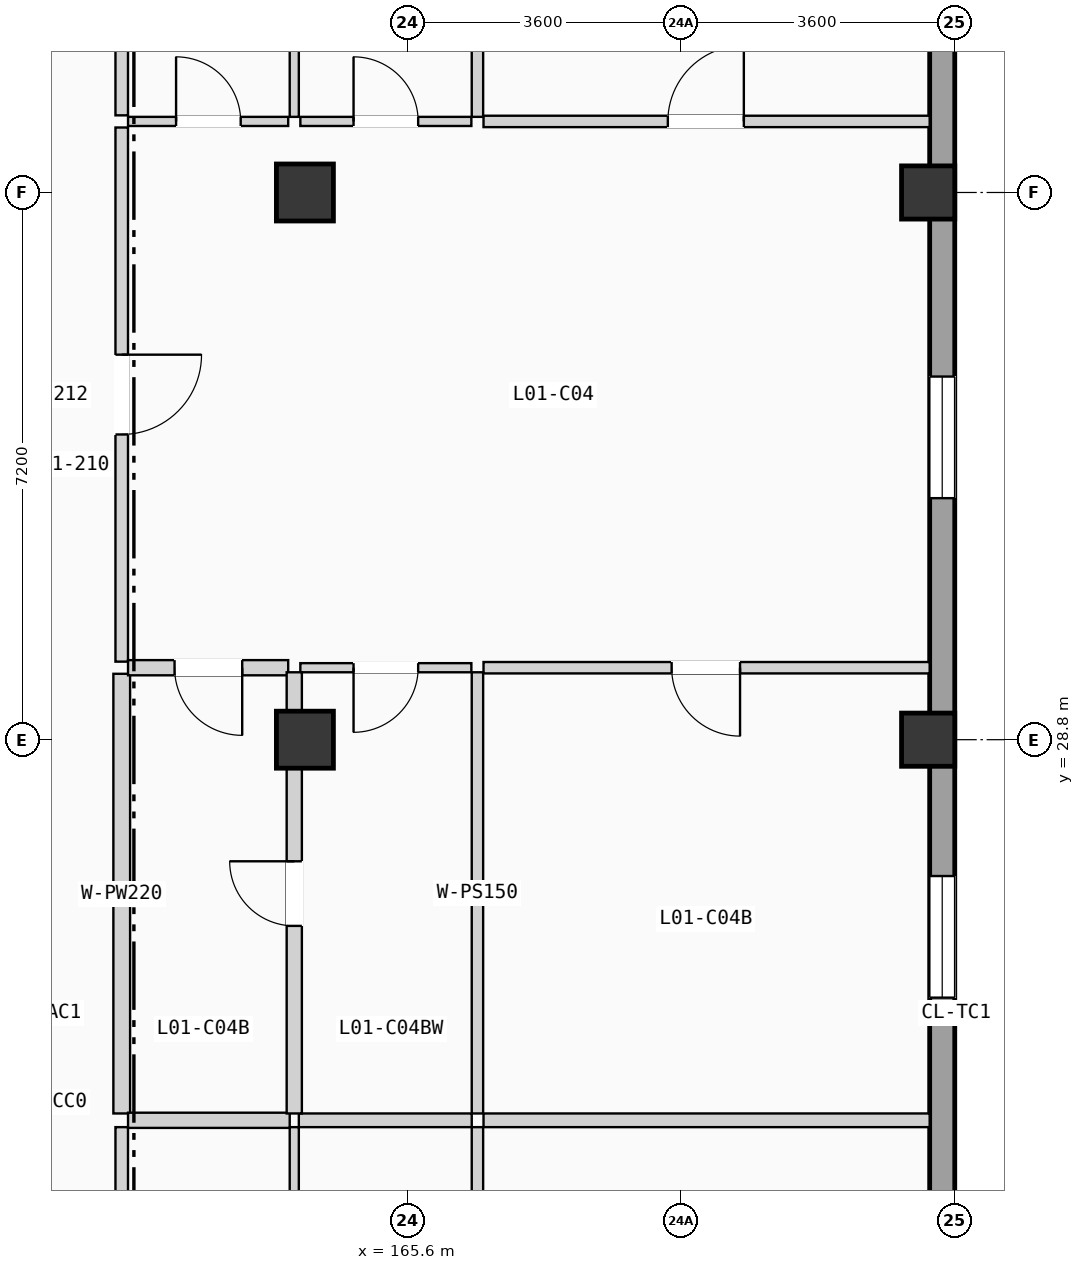
"""IFC4 building model, lengths in metres.
Left out: names, types, materials, properties, quantities, classifications, styles, units other than length and angle.
Written with IfcOpenShell. Run it as: python <this file> out.ifc"""

import sys

from ifc_helpers import new_model, si_unit, direction, frame, frame_2d, origin, origin_2d, place, context, subcontext, project, spatial, rectangle, extrude, element, fill, save


model = new_model("IFC4")
c1 = context("Model", 3, precision=1e-05, world=origin(), true_north=direction((0.0, 1.0)))
c2 = subcontext(c1, "Body", "Model", "MODEL_VIEW")
j1 = project(units=[si_unit("LENGTHUNIT", "METRE"), si_unit("PLANEANGLEUNIT", "RADIAN")], contexts=[c1])
p1 = place(None, origin())
s1 = spatial("IfcSite", under=j1, at=p1, CompositionType="ELEMENT")
p2 = place(p1, origin())
s2 = spatial("IfcBuilding", under=s1, at=p2, CompositionType="ELEMENT")
p3 = place(p2, frame((0.0, 0.0, 4.9)))
s3 = spatial("IfcBuildingStorey", under=s2, at=p3, CompositionType="ELEMENT", Elevation=4.9)
for number, where, z_axis, x_axis in (
    (1, (164.25, 28.8, 0.0), (0.0, 0.0, 1.0), (1.0, 0.0, 0.0)),
    (2, (164.25, 36.0, 0.0), (0.0, 0.0, 1.0), (1.0, 0.0, 0.0)),
):
    element("IfcColumn", number, at=place(p3, frame(where, z_axis=z_axis, x_axis=x_axis)), inside=s3, PredefinedType="COLUMN", context=c2, shape_type="SweptSolid", body=[
        extrude(rectangle(XDim=0.75, YDim=0.75, at=origin_2d()), origin(), (0.0, 0.0, 1.0), 3.675),
    ])
for number, where, z_axis, x_axis in (
    (3, (172.45, 28.8, 0.0), (0.0, 0.0, 1.0), (1.0, 0.0, 0.0)),
    (4, (172.45, 36.0, 0.0), (0.0, 0.0, 1.0), (1.0, 0.0, 0.0)),
):
    element("IfcColumn", number, at=place(p3, frame(where, z_axis=z_axis, x_axis=x_axis)), inside=s3, PredefinedType="COLUMN", context=c2, shape_type="SweptSolid", body=[
        extrude(rectangle(XDim=0.7, YDim=0.7, at=origin_2d()), origin(), (0.0, 0.0, 1.0), 3.675),
    ])
p4 = place(p3, frame((172.635, 0.33, 0.0), z_axis=(0.0, 0.0, 1.0), x_axis=(0.0, 1.0, 0.0)))
e5 = element("IfcWall", 5, at=p4, inside=s3, PredefinedType="SOLIDWALL", context=c2, shape_type="SweptSolid", body=[
    extrude(rectangle(XDim=49.74, YDim=0.33, at=frame_2d((24.87, 0.0))), origin(), (0.0, 0.0, 1.0), 3.415),
])
p5 = place(p4, frame((15.58, 0.0, 0.9)))
e6 = element("IfcOpeningElement", 6, at=p5, cuts=e5, PredefinedType="OPENING", context=c2, shape_type="SweptSolid", body=[
    extrude(rectangle(XDim=1.48, YDim=1.65, at=frame_2d((0.74, 0.825))), frame((0.0, 0.175, 0.0), z_axis=(0.0, -1.0, 0.0), x_axis=(1.0, 0.0, 0.0)), (0.0, 0.0, 1.0), 0.35),
])
p6 = place(p4, frame((8.986, 0.0, 0.9)))
e7 = element("IfcOpeningElement", 7, at=p6, cuts=e5, PredefinedType="OPENING", context=c2, shape_type="SweptSolid", body=[
    extrude(rectangle(XDim=1.48, YDim=1.8, at=frame_2d((0.74, 0.9))), frame((0.0, 0.175, 0.0), z_axis=(0.0, -1.0, 0.0), x_axis=(1.0, 0.0, 0.0)), (0.0, 0.0, 1.0), 0.35),
])
p7 = place(p4, frame((18.93, 0.0, 0.9)))
e8 = element("IfcOpeningElement", 8, at=p7, cuts=e5, PredefinedType="OPENING", context=c2, shape_type="SweptSolid", body=[
    extrude(rectangle(XDim=1.6, YDim=1.2, at=frame_2d((0.8, 0.6))), frame((0.0, 0.175, 0.0), z_axis=(0.0, -1.0, 0.0), x_axis=(1.0, 0.0, 0.0)), (0.0, 0.0, 1.0), 0.35),
])
p8 = place(p4, frame((31.648, 0.0, 0.9)))
e9 = element("IfcOpeningElement", 9, at=p8, cuts=e5, PredefinedType="OPENING", context=c2, shape_type="SweptSolid", body=[
    extrude(rectangle(XDim=1.6, YDim=1.35, at=frame_2d((0.8, 0.675))), frame((0.0, 0.175, 0.0), z_axis=(0.0, -1.0, 0.0), x_axis=(1.0, 0.0, 0.0)), (0.0, 0.0, 1.0), 0.35),
])
p9 = place(p4, frame((25.076, 0.0, 0.9)))
e10 = element("IfcOpeningElement", 10, at=p9, cuts=e5, PredefinedType="OPENING", context=c2, shape_type="SweptSolid", body=[
    extrude(rectangle(XDim=1.6, YDim=1.5, at=frame_2d((0.8, 0.75))), frame((0.0, 0.175, 0.0), z_axis=(0.0, -1.0, 0.0), x_axis=(1.0, 0.0, 0.0)), (0.0, 0.0, 1.0), 0.35),
])
p10 = place(p4, frame((38.778, 0.0, 0.9)))
e11 = element("IfcOpeningElement", 11, at=p10, cuts=e5, PredefinedType="OPENING", context=c2, shape_type="SweptSolid", body=[
    extrude(rectangle(XDim=1.6, YDim=1.65, at=frame_2d((0.8, 0.825))), frame((0.0, 0.175, 0.0), z_axis=(0.0, -1.0, 0.0), x_axis=(1.0, 0.0, 0.0)), (0.0, 0.0, 1.0), 0.35),
])
p11 = place(p3, frame((161.84, 18.79, 0.0), z_axis=(0.0, 0.0, 1.0), x_axis=(0.0, 1.0, 0.0)))
e12 = element("IfcWall", 12, at=p11, inside=s3, PredefinedType="PARTITIONING", context=c2, shape_type="SweptSolid", body=[
    extrude(rectangle(XDim=4.912, YDim=0.165, at=frame_2d((2.456, 0.0))), origin(), (0.0, 0.0, 1.0), 3.395),
])
p12 = place(p3, frame((161.84, 29.827, 0.0), z_axis=(0.0, 0.0, 1.0), x_axis=(0.0, 1.0, 0.0)))
e13 = element("IfcWall", 13, at=p12, inside=s3, PredefinedType="PARTITIONING", context=c2, shape_type="SweptSolid", body=[
    extrude(rectangle(XDim=7.028, YDim=0.165, at=frame_2d((3.514, 0.0))), origin(), (0.0, 0.0, 1.0), 3.395),
])
p13 = place(p12, frame((2.989, 0.0, 0.0)))
e14 = element("IfcOpeningElement", 14, at=p13, cuts=e13, PredefinedType="OPENING", context=c2, shape_type="SweptSolid", body=[
    extrude(rectangle(XDim=1.05, YDim=2.13, at=frame_2d((0.525, 1.065))), frame((0.0, 0.093, 0.0), z_axis=(0.0, -1.0, 0.0), x_axis=(1.0, 0.0, 0.0)), (0.0, 0.0, 1.0), 0.185),
])
p14 = place(p3, frame((161.84, 23.882, 0.0), z_axis=(0.0, 0.0, 1.0), x_axis=(0.0, 1.0, 0.0)))
e15 = element("IfcWall", 15, at=p14, inside=s3, PredefinedType="PLUMBINGWALL", context=c2, shape_type="SweptSolid", body=[
    extrude(rectangle(XDim=5.785, YDim=0.22, at=frame_2d((2.893, 0.0))), origin(), (0.0, 0.0, 1.0), 3.395),
])
p15 = place(p3, frame((161.84, 37.015, 0.0), z_axis=(0.0, 0.0, 1.0), x_axis=(0.0, 1.0, 0.0)))
e16 = element("IfcWall", 16, at=p15, inside=s3, PredefinedType="PARTITIONING", context=c2, shape_type="SweptSolid", body=[
    extrude(rectangle(XDim=5.785, YDim=0.165, at=frame_2d((2.893, 0.0))), origin(), (0.0, 0.0, 1.0), 3.395),
])
p16 = place(p3, frame((164.11, 18.77, 0.0), z_axis=(0.0, 0.0, 1.0), x_axis=(0.0, 1.0, 0.0)))
e17 = element("IfcWall", 17, at=p16, inside=s3, PredefinedType="PARTITIONING", context=c2, shape_type="SweptSolid", body=[
    extrude(rectangle(XDim=4.932, YDim=0.12, at=frame_2d((2.466, 0.0))), origin(), (0.0, 0.0, 1.0), 3.395),
])
p17 = place(p3, frame((161.923, 23.792, 0.0), z_axis=(0.0, 0.0, 1.0), x_axis=(1.0, 0.0, 0.0)))
e18 = element("IfcWall", 18, at=p17, inside=s3, PredefinedType="PLUMBINGWALL", context=c2, shape_type="SweptSolid", body=[
    extrude(rectangle(XDim=2.127, YDim=0.2, at=frame_2d((1.063, 0.0))), origin(), (0.0, 0.0, 1.0), 3.395),
])
p18 = place(p3, frame((166.52, 18.77, 0.0), z_axis=(0.0, 0.0, 1.0), x_axis=(0.0, 1.0, 0.0)))
e19 = element("IfcWall", 19, at=p18, inside=s3, PredefinedType="PARTITIONING", context=c2, shape_type="SweptSolid", body=[
    extrude(rectangle(XDim=4.932, YDim=0.15, at=frame_2d((2.466, 0.0))), origin(), (0.0, 0.0, 1.0), 3.395),
])
p19 = place(p3, frame((166.6, 23.792, 0.0), z_axis=(0.0, 0.0, 1.0), x_axis=(1.0, 0.0, 0.0)))
e20 = element("IfcWall", 20, at=p19, inside=s3, PredefinedType="PARTITIONING", context=c2, shape_type="SweptSolid", body=[
    extrude(rectangle(XDim=5.87, YDim=0.18, at=frame_2d((2.935, 0.0))), origin(), (0.0, 0.0, 1.0), 3.395),
])
p20 = place(p3, frame((164.17, 23.792, 0.0), z_axis=(0.0, 0.0, 1.0), x_axis=(1.0, 0.0, 0.0)))
e21 = element("IfcWall", 21, at=p20, inside=s3, PredefinedType="PARTITIONING", context=c2, shape_type="SweptSolid", body=[
    extrude(rectangle(XDim=2.275, YDim=0.18, at=frame_2d((1.138, 0.0))), origin(), (0.0, 0.0, 1.0), 3.395),
])
p21 = place(p3, frame((161.923, 29.747, 0.0), z_axis=(0.0, 0.0, 1.0), x_axis=(1.0, 0.0, 0.0)))
e22 = element("IfcWall", 22, at=p21, inside=s3, PredefinedType="PLUMBINGWALL", context=c2, shape_type="SweptSolid", body=[
    extrude(rectangle(XDim=2.107, YDim=0.2, at=frame_2d((1.053, 0.0))), origin(), (0.0, 0.0, 1.0), 3.395),
])
p22 = place(p21, frame((0.612, 0.0, 0.0)))
e23 = element("IfcOpeningElement", 23, at=p22, cuts=e22, PredefinedType="OPENING", context=c2, shape_type="SweptSolid", body=[
    extrude(rectangle(XDim=0.89, YDim=2.03, at=frame_2d((0.445, 1.015))), frame((0.0, 0.11, 0.0), z_axis=(0.0, -1.0, 0.0), x_axis=(1.0, 0.0, 0.0)), (0.0, 0.0, 1.0), 0.22),
])
p23 = place(p3, frame((161.923, 36.935, 0.0), z_axis=(0.0, 0.0, 1.0), x_axis=(1.0, 0.0, 0.0)))
e24 = element("IfcWall", 24, at=p23, inside=s3, PredefinedType="PARTITIONING", context=c2, shape_type="SweptSolid", body=[
    extrude(rectangle(XDim=2.107, YDim=0.12, at=frame_2d((1.053, 0.0))), origin(), (0.0, 0.0, 1.0), 3.395),
])
p24 = place(p23, frame((0.632, 0.0, 0.0)))
e25 = element("IfcOpeningElement", 25, at=p24, cuts=e24, PredefinedType="OPENING", context=c2, shape_type="SweptSolid", body=[
    extrude(rectangle(XDim=0.85, YDim=2.01, at=frame_2d((0.425, 1.005))), frame((0.0, 0.07, 0.0), z_axis=(0.0, -1.0, 0.0), x_axis=(1.0, 0.0, 0.0)), (0.0, 0.0, 1.0), 0.14),
])
p25 = place(p3, frame((166.6, 29.747, 0.0), z_axis=(0.0, 0.0, 1.0), x_axis=(1.0, 0.0, 0.0)))
e26 = element("IfcWall", 26, at=p25, inside=s3, PredefinedType="PARTITIONING", context=c2, shape_type="SweptSolid", body=[
    extrude(rectangle(XDim=5.87, YDim=0.15, at=frame_2d((2.935, 0.0))), origin(), (0.0, 0.0, 1.0), 3.395),
])
p26 = place(p25, frame((2.475, 0.0, 0.0)))
e27 = element("IfcOpeningElement", 27, at=p26, cuts=e26, PredefinedType="OPENING", context=c2, shape_type="SweptSolid", body=[
    extrude(rectangle(XDim=0.9, YDim=2.04, at=frame_2d((0.45, 1.02))), frame((0.0, 0.085, 0.0), z_axis=(0.0, -1.0, 0.0), x_axis=(1.0, 0.0, 0.0)), (0.0, 0.0, 1.0), 0.17),
])
p27 = place(p3, frame((164.19, 29.747, 0.0), z_axis=(0.0, 0.0, 1.0), x_axis=(1.0, 0.0, 0.0)))
e28 = element("IfcWall", 28, at=p27, inside=s3, PredefinedType="PARTITIONING", context=c2, shape_type="SweptSolid", body=[
    extrude(rectangle(XDim=2.25, YDim=0.12, at=frame_2d((1.125, 0.0))), origin(), (0.0, 0.0, 1.0), 3.395),
])
p28 = place(p27, frame((0.7, 0.0, 0.0)))
e29 = element("IfcOpeningElement", 29, at=p28, cuts=e28, PredefinedType="OPENING", context=c2, shape_type="SweptSolid", body=[
    extrude(rectangle(XDim=0.85, YDim=2.01, at=frame_2d((0.425, 1.005))), frame((0.0, 0.07, 0.0), z_axis=(0.0, -1.0, 0.0), x_axis=(1.0, 0.0, 0.0)), (0.0, 0.0, 1.0), 0.14),
])
p29 = place(p3, frame((166.6, 36.935, 0.0), z_axis=(0.0, 0.0, 1.0), x_axis=(1.0, 0.0, 0.0)))
e30 = element("IfcWall", 30, at=p29, inside=s3, PredefinedType="PARTITIONING", context=c2, shape_type="SweptSolid", body=[
    extrude(rectangle(XDim=5.87, YDim=0.15, at=frame_2d((2.935, 0.0))), origin(), (0.0, 0.0, 1.0), 3.395),
])
p30 = place(p29, frame((2.425, 0.0, 0.0)))
e31 = element("IfcOpeningElement", 31, at=p30, cuts=e30, PredefinedType="OPENING", context=c2, shape_type="SweptSolid", body=[
    extrude(rectangle(XDim=1.0, YDim=2.06, at=frame_2d((0.5, 1.03))), frame((0.0, 0.085, 0.0), z_axis=(0.0, -1.0, 0.0), x_axis=(1.0, 0.0, 0.0)), (0.0, 0.0, 1.0), 0.17),
])
p31 = place(p3, frame((164.19, 36.935, 0.0), z_axis=(0.0, 0.0, 1.0), x_axis=(1.0, 0.0, 0.0)))
e32 = element("IfcWall", 32, at=p31, inside=s3, PredefinedType="PARTITIONING", context=c2, shape_type="SweptSolid", body=[
    extrude(rectangle(XDim=2.25, YDim=0.12, at=frame_2d((1.125, 0.0))), origin(), (0.0, 0.0, 1.0), 3.395),
])
p32 = place(p31, frame((0.7, 0.0, 0.0)))
e33 = element("IfcOpeningElement", 33, at=p32, cuts=e32, PredefinedType="OPENING", context=c2, shape_type="SweptSolid", body=[
    extrude(rectangle(XDim=0.85, YDim=2.01, at=frame_2d((0.425, 1.005))), frame((0.0, 0.07, 0.0), z_axis=(0.0, -1.0, 0.0), x_axis=(1.0, 0.0, 0.0)), (0.0, 0.0, 1.0), 0.14),
])
p33 = place(p3, frame((164.11, 23.882, 0.0), z_axis=(0.0, 0.0, 1.0), x_axis=(0.0, 1.0, 0.0)))
e34 = element("IfcWall", 34, at=p33, inside=s3, PredefinedType="PLUMBINGWALL", context=c2, shape_type="SweptSolid", body=[
    extrude(rectangle(XDim=5.805, YDim=0.2, at=frame_2d((2.902, 0.0))), origin(), (0.0, 0.0, 1.0), 3.395),
])
p34 = place(p33, frame((2.468, 0.0, 0.0)))
e35 = element("IfcOpeningElement", 35, at=p34, cuts=e34, PredefinedType="OPENING", context=c2, shape_type="SweptSolid", body=[
    extrude(rectangle(XDim=0.85, YDim=2.01, at=frame_2d((0.425, 1.005))), frame((0.0, 0.11, 0.0), z_axis=(0.0, -1.0, 0.0), x_axis=(1.0, 0.0, 0.0)), (0.0, 0.0, 1.0), 0.22),
])
p35 = place(p3, frame((164.11, 36.995, 0.0), z_axis=(0.0, 0.0, 1.0), x_axis=(0.0, 1.0, 0.0)))
e36 = element("IfcWall", 36, at=p35, inside=s3, PredefinedType="PARTITIONING", context=c2, shape_type="SweptSolid", body=[
    extrude(rectangle(XDim=5.805, YDim=0.12, at=frame_2d((2.902, 0.0))), origin(), (0.0, 0.0, 1.0), 3.395),
])
for number, where, z_axis, x_axis in (
    (37, (166.52, 23.882, 0.0), (0.0, 0.0, 1.0), (0.0, 1.0, 0.0)),
    (38, (166.52, 36.995, 0.0), (0.0, 0.0, 1.0), (0.0, 1.0, 0.0)),
):
    element("IfcWall", number, at=place(p3, frame(where, z_axis=z_axis, x_axis=x_axis)), inside=s3, PredefinedType="PARTITIONING", context=c2, shape_type="SweptSolid", body=[
        extrude(rectangle(XDim=5.805, YDim=0.15, at=frame_2d((2.902, 0.0))), origin(), (0.0, 0.0, 1.0), 3.395),
    ])
p36 = place(p8, origin())
e39 = element("IfcWindow", 39, at=p36, inside=s3, PartitioningType="DOUBLE_PANEL_VERTICAL", PredefinedType="WINDOW", context=c2, shape_type="SweptSolid", body=[
    extrude(rectangle(XDim=1.6, YDim=1.35, at=frame_2d((0.8, 0.675))), frame((0.0, 0.03, 0.0), z_axis=(0.0, -1.0, 0.0), x_axis=(1.0, 0.0, 0.0)), (0.0, 0.0, 1.0), 0.06),
])
fill(e9, e39)
p37 = place(p9, origin())
e40 = element("IfcWindow", 40, at=p37, inside=s3, PartitioningType="DOUBLE_PANEL_VERTICAL", PredefinedType="WINDOW", context=c2, shape_type="SweptSolid", body=[
    extrude(rectangle(XDim=1.6, YDim=1.5, at=frame_2d((0.8, 0.75))), frame((0.0, 0.03, 0.0), z_axis=(0.0, -1.0, 0.0), x_axis=(1.0, 0.0, 0.0)), (0.0, 0.0, 1.0), 0.06),
])
fill(e10, e40)
p38 = place(p13, frame((1.05, 0.0, 0.0), z_axis=(0.0, 0.0, 1.0), x_axis=(-1.0, 0.0, 0.0)))
e41 = element("IfcDoor", 41, at=p38, inside=s3, OperationType="SINGLE_SWING_RIGHT", PredefinedType="DOOR", context=c2, shape_type="SweptSolid", body=[
    extrude(rectangle(XDim=1.05, YDim=2.13, at=frame_2d((0.525, 1.065))), frame((0.0, 0.025, 0.0), z_axis=(0.0, -1.0, 0.0), x_axis=(1.0, 0.0, 0.0)), (0.0, 0.0, 1.0), 0.05),
])
fill(e14, e41)
p39 = place(p22, frame((0.89, 0.0, 0.0), z_axis=(0.0, 0.0, 1.0), x_axis=(-1.0, 0.0, 0.0)))
e42 = element("IfcDoor", 42, at=p39, inside=s3, OperationType="SINGLE_SWING_RIGHT", PredefinedType="DOOR", context=c2, shape_type="SweptSolid", body=[
    extrude(rectangle(XDim=0.89, YDim=2.03, at=frame_2d((0.445, 1.015))), frame((0.0, 0.025, 0.0), z_axis=(0.0, -1.0, 0.0), x_axis=(1.0, 0.0, 0.0)), (0.0, 0.0, 1.0), 0.05),
])
fill(e23, e42)
p40 = place(p24, origin())
e43 = element("IfcDoor", 43, at=p40, inside=s3, OperationType="SINGLE_SWING_LEFT", PredefinedType="DOOR", context=c2, shape_type="SweptSolid", body=[
    extrude(rectangle(XDim=0.85, YDim=2.01, at=frame_2d((0.425, 1.005))), frame((0.0, 0.025, 0.0), z_axis=(0.0, -1.0, 0.0), x_axis=(1.0, 0.0, 0.0)), (0.0, 0.0, 1.0), 0.05),
])
fill(e25, e43)
p41 = place(p26, frame((0.9, 0.0, 0.0), z_axis=(0.0, 0.0, 1.0), x_axis=(-1.0, 0.0, 0.0)))
e44 = element("IfcDoor", 44, at=p41, inside=s3, OperationType="SINGLE_SWING_RIGHT", PredefinedType="DOOR", context=c2, shape_type="SweptSolid", body=[
    extrude(rectangle(XDim=0.9, YDim=2.04, at=frame_2d((0.45, 1.02))), frame((0.0, 0.025, 0.0), z_axis=(0.0, -1.0, 0.0), x_axis=(1.0, 0.0, 0.0)), (0.0, 0.0, 1.0), 0.05),
])
fill(e27, e44)
p42 = place(p28, frame((0.85, 0.0, 0.0), z_axis=(0.0, 0.0, 1.0), x_axis=(-1.0, 0.0, 0.0)))
e45 = element("IfcDoor", 45, at=p42, inside=s3, OperationType="SINGLE_SWING_LEFT", PredefinedType="DOOR", context=c2, shape_type="SweptSolid", body=[
    extrude(rectangle(XDim=0.85, YDim=2.01, at=frame_2d((0.425, 1.005))), frame((0.0, 0.025, 0.0), z_axis=(0.0, -1.0, 0.0), x_axis=(1.0, 0.0, 0.0)), (0.0, 0.0, 1.0), 0.05),
])
fill(e29, e45)
p43 = place(p30, origin())
e46 = element("IfcDoor", 46, at=p43, inside=s3, OperationType="SINGLE_SWING_RIGHT", PredefinedType="DOOR", context=c2, shape_type="SweptSolid", body=[
    extrude(rectangle(XDim=1.0, YDim=2.06, at=frame_2d((0.5, 1.03))), frame((0.0, 0.025, 0.0), z_axis=(0.0, -1.0, 0.0), x_axis=(1.0, 0.0, 0.0)), (0.0, 0.0, 1.0), 0.05),
])
fill(e31, e46)
p44 = place(p32, origin())
e47 = element("IfcDoor", 47, at=p44, inside=s3, OperationType="SINGLE_SWING_LEFT", PredefinedType="DOOR", context=c2, shape_type="SweptSolid", body=[
    extrude(rectangle(XDim=0.85, YDim=2.01, at=frame_2d((0.425, 1.005))), frame((0.0, 0.025, 0.0), z_axis=(0.0, -1.0, 0.0), x_axis=(1.0, 0.0, 0.0)), (0.0, 0.0, 1.0), 0.05),
])
fill(e33, e47)
p45 = place(p34, origin())
e48 = element("IfcDoor", 48, at=p45, inside=s3, OperationType="SINGLE_SWING_RIGHT", PredefinedType="DOOR", context=c2, shape_type="SweptSolid", body=[
    extrude(rectangle(XDim=0.85, YDim=2.01, at=frame_2d((0.425, 1.005))), frame((0.0, 0.025, 0.0), z_axis=(0.0, -1.0, 0.0), x_axis=(1.0, 0.0, 0.0)), (0.0, 0.0, 1.0), 0.05),
])
fill(e35, e48)
save(model, sys.argv[1])
